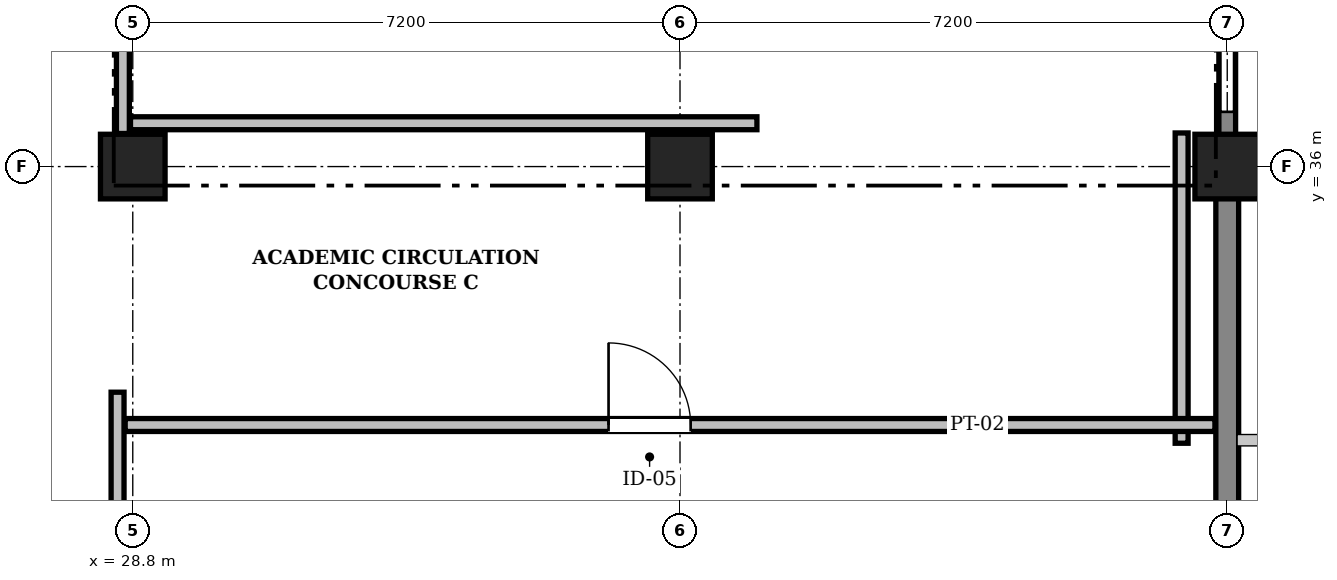
"""IFC4 building model, lengths in metres.
Left out: names, types, materials, properties, quantities, classifications, styles, units other than length and angle.
Written with IfcOpenShell. Run it as: python <this file> out.ifc"""

import sys

from ifc_helpers import new_model, si_unit, direction, frame, frame_2d, origin, origin_2d, place, context, subcontext, project, spatial, rectangle, extrude, element, fill, save


model = new_model("IFC4")
c1 = context("Model", 3, precision=1e-05, world=origin(), true_north=direction((0.0, 1.0)))
c2 = subcontext(c1, "Body", "Model", "MODEL_VIEW")
j1 = project(units=[si_unit("LENGTHUNIT", "METRE"), si_unit("PLANEANGLEUNIT", "RADIAN")], contexts=[c1])
p1 = place(None, origin())
s1 = spatial("IfcSite", under=j1, at=p1, CompositionType="ELEMENT")
p2 = place(p1, origin())
s2 = spatial("IfcBuilding", under=s1, at=p2, CompositionType="ELEMENT")
p3 = place(p2, frame((0.0, 0.0, 4.8)))
s3 = spatial("IfcBuildingStorey", under=s2, at=p3, CompositionType="ELEMENT", Elevation=4.8)
for number, where, z_axis, x_axis in (
    (1, (28.8, 36.0, 0.0), (0.0, 0.0, 1.0), (1.0, 0.0, 0.0)),
    (2, (36.0, 36.0, 0.0), (0.0, 0.0, 1.0), (1.0, 0.0, 0.0)),
    (3, (43.2, 36.0, 0.0), (0.0, 0.0, 1.0), (1.0, 0.0, 0.0)),
):
    element("IfcColumn", number, at=place(p3, frame(where, z_axis=z_axis, x_axis=x_axis)), inside=s3, PredefinedType="COLUMN", context=c2, shape_type="SweptSolid", body=[
        extrude(rectangle(XDim=0.85, YDim=0.85, at=origin_2d()), origin(), (0.0, 0.0, 1.0), 4.8),
    ])
p4 = place(p3, frame((43.2, 43.2, 0.0), z_axis=(0.0, 0.0, 1.0), x_axis=(0.0, -1.0, 0.0)))
e4 = element("IfcWall", 4, at=p4, inside=s3, PredefinedType="SOLIDWALL", context=c2, shape_type="SweptSolid", body=[
    extrude(rectangle(XDim=7.2, YDim=0.22, at=frame_2d((3.6, 0.0))), origin(), (0.0, 0.0, 1.0), 1.24),
])
p5 = place(p3, frame((43.2, 36.0, 0.0), z_axis=(0.0, 0.0, 1.0), x_axis=(0.0, -1.0, 0.0)))
e5 = element("IfcWall", 5, at=p5, inside=s3, PredefinedType="SOLIDWALL", context=c2, shape_type="SweptSolid", body=[
    extrude(rectangle(XDim=7.034, YDim=0.3, at=frame_2d((3.517, 0.0))), origin(), (0.0, 0.0, 1.0), 4.52),
])
p6 = place(p5, frame((4.452, 0.0, 0.95)))
e6 = element("IfcOpeningElement", 6, at=p6, cuts=e5, PredefinedType="OPENING", context=c2, shape_type="SweptSolid", body=[
    extrude(rectangle(XDim=1.45, YDim=1.3, at=frame_2d((0.725, 0.65))), frame((0.0, 0.162, 0.0), z_axis=(0.0, -1.0, 0.0), x_axis=(1.0, 0.0, 0.0)), (0.0, 0.0, 1.0), 0.324),
])
p7 = place(p3, frame((28.67, 36.435, 0.0), z_axis=(0.0, 0.0, 1.0), x_axis=(0.0, 1.0, 0.0)))
e7 = element("IfcWall", 7, at=p7, inside=s3, PredefinedType="PARTITIONING", context=c2, shape_type="SweptSolid", body=[
    extrude(rectangle(XDim=4.335, YDim=0.17, at=frame_2d((2.167, 0.0))), origin(), (0.0, 0.0, 1.0), 4.08),
])
p8 = place(p7, frame((1.627, 0.0, 0.0)))
e8 = element("IfcOpeningElement", 8, at=p8, cuts=e7, PredefinedType="OPENING", context=c2, shape_type="SweptSolid", body=[
    extrude(rectangle(XDim=1.08, YDim=2.2, at=frame_2d((0.54, 1.1))), frame((0.0, 0.097, 0.0), z_axis=(0.0, -1.0, 0.0), x_axis=(1.0, 0.0, 0.0)), (0.0, 0.0, 1.0), 0.194),
])
p9 = place(p3, frame((28.6, 29.31, 0.0), z_axis=(0.0, 0.0, 1.0), x_axis=(0.0, 1.0, 0.0)))
e9 = element("IfcWall", 9, at=p9, inside=s3, PredefinedType="PARTITIONING", context=c2, shape_type="SweptSolid", body=[
    extrude(rectangle(XDim=3.721, YDim=0.17, at=frame_2d((1.861, 0.0))), origin(), (0.0, 0.0, 1.0), 4.08),
])
p10 = place(p3, frame((28.77, 36.57, 0.0), z_axis=(0.0, 0.0, 1.0), x_axis=(1.0, 0.0, 0.0)))
e10 = element("IfcWall", 10, at=p10, inside=s3, PredefinedType="PARTITIONING", context=c2, shape_type="SweptSolid", body=[
    extrude(rectangle(XDim=8.242, YDim=0.17, at=frame_2d((4.121, 0.0))), origin(), (0.0, 0.0, 1.0), 4.46),
])
p11 = place(p3, frame((42.6, 32.36, 0.0), z_axis=(0.0, 0.0, 1.0), x_axis=(0.0, 1.0, 0.0)))
e11 = element("IfcWall", 11, at=p11, inside=s3, PredefinedType="PARTITIONING", context=c2, shape_type="SweptSolid", body=[
    extrude(rectangle(XDim=4.082, YDim=0.17, at=frame_2d((2.041, 0.0))), origin(), (0.0, 0.0, 1.0), 4.46),
])
p12 = place(p3, frame((28.7, 32.6, 0.0), z_axis=(0.0, 0.0, 1.0), x_axis=(1.0, 0.0, 0.0)))
e12 = element("IfcWall", 12, at=p12, inside=s3, PredefinedType="PARTITIONING", context=c2, shape_type="SweptSolid", body=[
    extrude(rectangle(XDim=14.338, YDim=0.17, at=frame_2d((7.169, 0.0))), origin(), (0.0, 0.0, 1.0), 4.46),
])
p13 = place(p12, frame((6.36, 0.0, 0.0)))
e13 = element("IfcOpeningElement", 13, at=p13, cuts=e12, PredefinedType="OPENING", context=c2, shape_type="SweptSolid", body=[
    extrude(rectangle(XDim=1.08, YDim=2.2, at=frame_2d((0.54, 1.1))), frame((0.0, 0.097, 0.0), z_axis=(0.0, -1.0, 0.0), x_axis=(1.0, 0.0, 0.0)), (0.0, 0.0, 1.0), 0.194),
])
p14 = place(p13, origin())
e14 = element("IfcDoor", 14, at=p14, inside=s3, OperationType="SINGLE_SWING_LEFT", PredefinedType="DOOR", context=c2, shape_type="SweptSolid", body=[
    extrude(rectangle(XDim=1.08, YDim=2.2, at=frame_2d((0.54, 1.1))), frame((0.0, 0.025, 0.0), z_axis=(0.0, -1.0, 0.0), x_axis=(1.0, 0.0, 0.0)), (0.0, 0.0, 1.0), 0.05),
])
fill(e13, e14)
save(model, sys.argv[1])
